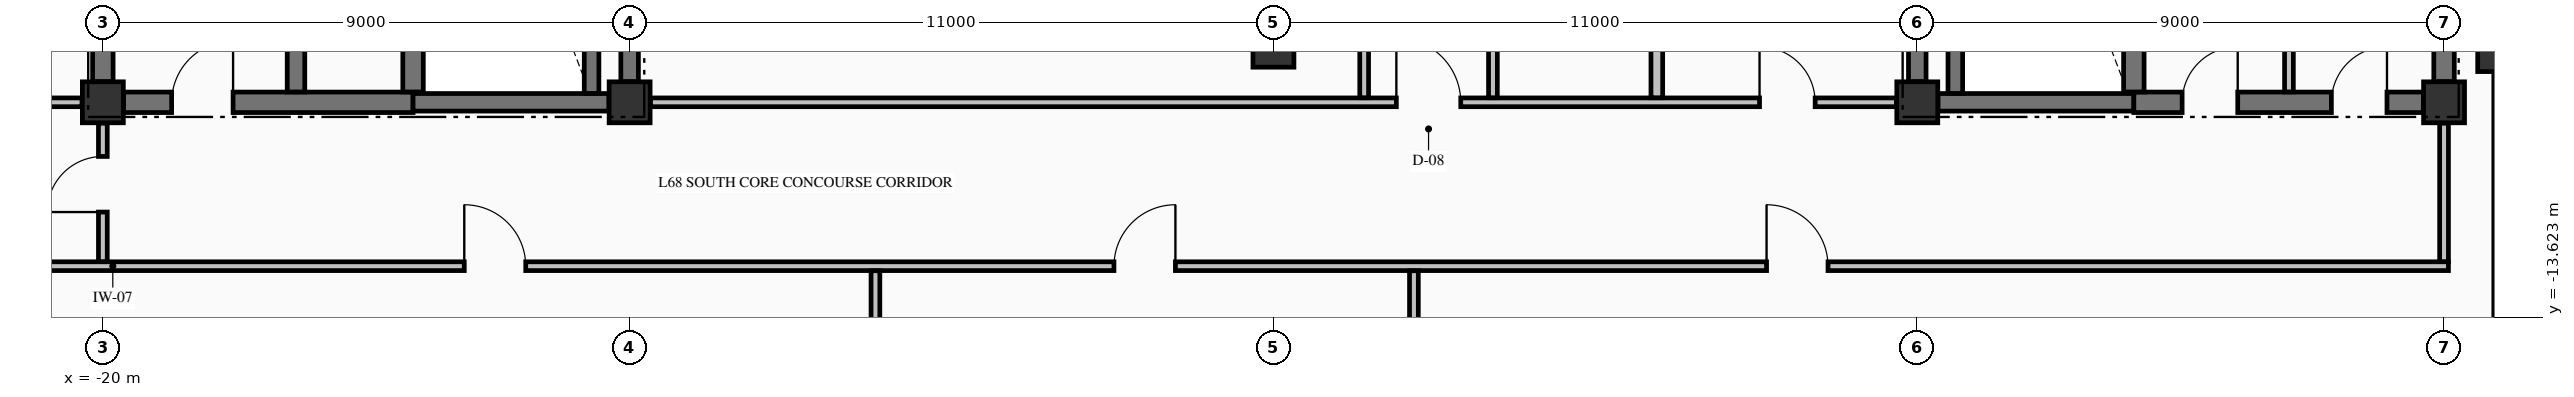
"""IFC4 building model, lengths in metres.
Left out: names, types, materials, properties, quantities, classifications, styles, units other than length and angle.
Written with IfcOpenShell. Run it as: python <this file> out.ifc"""

import sys

from ifc_helpers import new_model, si_unit, direction, frame, frame_2d, origin, origin_2d, place, context, subcontext, project, spatial, rectangle, extrude, element, fill, save


model = new_model("IFC4")
c1 = context("Model", 3, precision=1e-05, world=origin(), true_north=direction((0.0, 1.0)))
c2 = subcontext(c1, "Body", "Model", "MODEL_VIEW")
j1 = project(units=[si_unit("LENGTHUNIT", "METRE"), si_unit("PLANEANGLEUNIT", "RADIAN")], contexts=[c1])
p1 = place(None, origin())
s1 = spatial("IfcSite", under=j1, at=p1, CompositionType="ELEMENT")
p2 = place(p1, origin())
s2 = spatial("IfcBuilding", under=s1, at=p2, CompositionType="ELEMENT")
p3 = place(p2, frame((0.0, 0.0, 257.66)))
s3 = spatial("IfcBuildingStorey", under=s2, at=p3, CompositionType="ELEMENT", Elevation=257.66)
p4 = place(p3, frame((21.0, -9.0, -0.25), z_axis=(0.0, 0.0, 1.0), x_axis=(1.0, 0.0, 0.0)))
e1 = element("IfcColumn", 1, at=p4, inside=s3, PredefinedType="COLUMN", context=c2, shape_type="SweptSolid", body=[
    extrude(rectangle(XDim=0.85, YDim=0.85, at=origin_2d()), origin(), (0.0, 0.0, 1.0), 3.23),
])
for number, where, z_axis, x_axis in (
    (2, (-20.0, -9.95, -0.25), (0.0, 0.0, 1.0), (1.0, 0.0, 0.0)),
    (3, (-11.0, -9.95, -0.25), (0.0, 0.0, 1.0), (1.0, 0.0, 0.0)),
    (4, (11.0, -9.95, -0.25), (0.0, 0.0, 1.0), (1.0, 0.0, 0.0)),
    (5, (20.0, -9.95, -0.25), (0.0, 0.0, 1.0), (1.0, 0.0, 0.0)),
    (6, (0.0, -9.0, -0.25), (0.0, 0.0, 1.0), (1.0, 0.0, 0.0)),
):
    element("IfcColumn", number, at=place(p3, frame(where, z_axis=z_axis, x_axis=x_axis)), inside=s3, PredefinedType="COLUMN", context=c2, shape_type="SweptSolid", body=[
        extrude(rectangle(XDim=0.7, YDim=0.7, at=origin_2d()), origin(), (0.0, 0.0, 1.0), 3.23),
    ])
p5 = place(p3, frame((21.0, -17.545, 0.0), z_axis=(0.0, 0.0, 1.0), x_axis=(0.0, 1.0, 0.0)))
e7 = element("IfcWall", 7, at=p5, inside=s3, PredefinedType="STANDARD", context=c2, shape_type="SweptSolid", body=[
    extrude(rectangle(XDim=8.09, YDim=0.3, at=frame_2d((4.045, 0.0))), origin(), (0.0, 0.0, 1.0), 2.372),
])
p6 = place(p3, frame((-19.646, -9.95, 0.0), z_axis=(0.0, 0.0, 1.0), x_axis=(1.0, 0.0, 0.0)))
e8 = element("IfcWall", 8, at=p6, inside=s3, PredefinedType="SHEAR", context=c2, shape_type="SweptSolid", body=[
    extrude(rectangle(XDim=4.946, YDim=0.35, at=frame_2d((2.473, 0.0))), origin(), (0.0, 0.0, 1.0), 2.98),
])
p7 = place(p6, frame((0.821, 0.0, 0.0)))
e9 = element("IfcOpeningElement", 9, at=p7, cuts=e8, PredefinedType="OPENING", context=c2, shape_type="SweptSolid", body=[
    extrude(rectangle(XDim=1.05, YDim=2.15, at=frame_2d((0.525, 1.075))), frame((0.0, 0.185, 0.0), z_axis=(0.0, -1.0, 0.0), x_axis=(1.0, 0.0, 0.0)), (0.0, 0.0, 1.0), 0.37),
])
for number, where, z_axis, x_axis in (
    (10, (-14.7, -9.95, 0.0), (0.0, 0.0, 1.0), (1.0, 0.0, 0.0)),
    (11, (11.354, -9.95, 0.0), (0.0, 0.0, 1.0), (1.0, 0.0, 0.0)),
):
    element("IfcWall", number, at=place(p3, frame(where, z_axis=z_axis, x_axis=x_axis)), inside=s3, PredefinedType="SHEAR", context=c2, shape_type="SweptSolid", body=[
        extrude(rectangle(XDim=3.346, YDim=0.3, at=frame_2d((1.673, 0.0))), origin(), (0.0, 0.0, 1.0), 2.98),
    ])
p8 = place(p3, frame((14.7, -9.95, 0.0), z_axis=(0.0, 0.0, 1.0), x_axis=(1.0, 0.0, 0.0)))
e12 = element("IfcWall", 12, at=p8, inside=s3, PredefinedType="SHEAR", context=c2, shape_type="SweptSolid", body=[
    extrude(rectangle(XDim=4.946, YDim=0.35, at=frame_2d((2.473, 0.0))), origin(), (0.0, 0.0, 1.0), 2.98),
])
p9 = place(p8, frame((0.825, 0.0, 0.0)))
e13 = element("IfcOpeningElement", 13, at=p9, cuts=e12, PredefinedType="OPENING", context=c2, shape_type="SweptSolid", body=[
    extrude(rectangle(XDim=0.95, YDim=2.15, at=frame_2d((0.475, 1.075))), frame((0.0, 0.185, 0.0), z_axis=(0.0, -1.0, 0.0), x_axis=(1.0, 0.0, 0.0)), (0.0, 0.0, 1.0), 0.37),
])
p10 = place(p8, frame((3.375, 0.0, 0.0)))
e14 = element("IfcOpeningElement", 14, at=p10, cuts=e12, PredefinedType="OPENING", context=c2, shape_type="SweptSolid", body=[
    extrude(rectangle(XDim=0.95, YDim=2.15, at=frame_2d((0.475, 1.075))), frame((0.0, 0.185, 0.0), z_axis=(0.0, -1.0, 0.0), x_axis=(1.0, 0.0, 0.0)), (0.0, 0.0, 1.0), 0.37),
])
p11 = place(p3, frame((-25.835, -12.75, 0.0), z_axis=(0.0, 0.0, 1.0), x_axis=(1.0, 0.0, 0.0)))
e15 = element("IfcWall", 15, at=p11, inside=s3, PredefinedType="PARTITIONING", context=c2, shape_type="SweptSolid", body=[
    extrude(rectangle(XDim=45.91, YDim=0.15, at=frame_2d((22.955, 0.0))), origin(), (0.0, 0.0, 1.0), 2.98),
])
p12 = place(p11, frame((12.01, 0.0, 0.0)))
e16 = element("IfcOpeningElement", 16, at=p12, cuts=e15, PredefinedType="OPENING", context=c2, shape_type="SweptSolid", body=[
    extrude(rectangle(XDim=1.05, YDim=2.15, at=frame_2d((0.525, 1.075))), frame((0.0, 0.085, 0.0), z_axis=(0.0, -1.0, 0.0), x_axis=(1.0, 0.0, 0.0)), (0.0, 0.0, 1.0), 0.17),
])
p13 = place(p11, frame((23.11, 0.0, 0.0)))
e17 = element("IfcOpeningElement", 17, at=p13, cuts=e15, PredefinedType="OPENING", context=c2, shape_type="SweptSolid", body=[
    extrude(rectangle(XDim=1.05, YDim=2.15, at=frame_2d((0.525, 1.075))), frame((0.0, 0.085, 0.0), z_axis=(0.0, -1.0, 0.0), x_axis=(1.0, 0.0, 0.0)), (0.0, 0.0, 1.0), 0.17),
])
p14 = place(p11, frame((34.26, 0.0, 0.0)))
e18 = element("IfcOpeningElement", 18, at=p14, cuts=e15, PredefinedType="OPENING", context=c2, shape_type="SweptSolid", body=[
    extrude(rectangle(XDim=1.05, YDim=2.15, at=frame_2d((0.525, 1.075))), frame((0.0, 0.085, 0.0), z_axis=(0.0, -1.0, 0.0), x_axis=(1.0, 0.0, 0.0)), (0.0, 0.0, 1.0), 0.17),
])
p15 = place(p3, frame((-25.835, -9.95, 0.0), z_axis=(0.0, 0.0, 1.0), x_axis=(1.0, 0.0, 0.0)))
e19 = element("IfcWall", 19, at=p15, inside=s3, PredefinedType="PARTITIONING", context=c2, shape_type="SweptSolid", body=[
    extrude(rectangle(XDim=5.479, YDim=0.15, at=frame_2d((2.74, 0.0))), origin(), (0.0, 0.0, 1.0), 2.98),
])
p16 = place(p15, frame((2.36, 0.0, 0.0)))
e20 = element("IfcOpeningElement", 20, at=p16, cuts=e19, PredefinedType="OPENING", context=c2, shape_type="SweptSolid", body=[
    extrude(rectangle(XDim=0.95, YDim=2.15, at=frame_2d((0.475, 1.075))), frame((0.0, 0.085, 0.0), z_axis=(0.0, -1.0, 0.0), x_axis=(1.0, 0.0, 0.0)), (0.0, 0.0, 1.0), 0.17),
])
p17 = place(p3, frame((-10.644, -9.95, 0.0), z_axis=(0.0, 0.0, 1.0), x_axis=(1.0, 0.0, 0.0)))
e21 = element("IfcWall", 21, at=p17, inside=s3, PredefinedType="PARTITIONING", context=c2, shape_type="SweptSolid", body=[
    extrude(rectangle(XDim=21.288, YDim=0.15, at=frame_2d((10.644, 0.0))), origin(), (0.0, 0.0, 1.0), 2.98),
])
p18 = place(p17, frame((12.744, 0.0, 0.0)))
e22 = element("IfcOpeningElement", 22, at=p18, cuts=e21, PredefinedType="OPENING", context=c2, shape_type="SweptSolid", body=[
    extrude(rectangle(XDim=1.1, YDim=2.15, at=frame_2d((0.55, 1.075))), frame((0.0, 0.085, 0.0), z_axis=(0.0, -1.0, 0.0), x_axis=(1.0, 0.0, 0.0)), (0.0, 0.0, 1.0), 0.17),
])
p19 = place(p17, frame((18.949, 0.0, 0.0)))
e23 = element("IfcOpeningElement", 23, at=p19, cuts=e21, PredefinedType="OPENING", context=c2, shape_type="SweptSolid", body=[
    extrude(rectangle(XDim=0.95, YDim=2.15, at=frame_2d((0.475, 1.075))), frame((0.0, 0.085, 0.0), z_axis=(0.0, -1.0, 0.0), x_axis=(1.0, 0.0, 0.0)), (0.0, 0.0, 1.0), 0.17),
])
p20 = place(p3, frame((-20.0, -9.596, 0.0), z_axis=(0.0, 0.0, 1.0), x_axis=(0.0, 1.0, 0.0)))
e24 = element("IfcWall", 24, at=p20, inside=s3, PredefinedType="SHEAR", context=c2, shape_type="SweptSolid", body=[
    extrude(rectangle(XDim=9.242, YDim=0.35, at=frame_2d((4.621, 0.0))), origin(), (0.0, 0.0, 1.0), 2.98),
])
p21 = place(p3, frame((-16.7, -9.773, 0.0), z_axis=(0.0, 0.0, 1.0), x_axis=(0.0, 1.0, 0.0)))
e25 = element("IfcWall", 25, at=p21, inside=s3, PredefinedType="SHEAR", context=c2, shape_type="SweptSolid", body=[
    extrude(rectangle(XDim=9.371, YDim=0.3, at=frame_2d((4.686, 0.0))), origin(), (0.0, 0.0, 1.0), 2.98),
])
p22 = place(p3, frame((-14.7, -9.773, 0.0), z_axis=(0.0, 0.0, 1.0), x_axis=(0.0, 1.0, 0.0)))
e26 = element("IfcWall", 26, at=p22, inside=s3, PredefinedType="SHEAR", context=c2, shape_type="SweptSolid", body=[
    extrude(rectangle(XDim=9.371, YDim=0.35, at=frame_2d((4.686, 0.0))), origin(), (0.0, 0.0, 1.0), 2.98),
])
p23 = place(p3, frame((-11.65, -9.798, 0.0), z_axis=(0.0, 0.0, 1.0), x_axis=(0.0, 1.0, 0.0)))
e27 = element("IfcWall", 27, at=p23, inside=s3, PredefinedType="SOLIDWALL", context=c2, shape_type="SweptSolid", body=[
    extrude(rectangle(XDim=9.396, YDim=0.25, at=frame_2d((4.698, 0.0))), origin(), (0.0, 0.0, 1.0), 2.98),
])
for number, where, z_axis, x_axis in (
    (28, (-11.0, -9.596, 0.0), (0.0, 0.0, 1.0), (0.0, 1.0, 0.0)),
    (29, (11.0, -9.596, 0.0), (0.0, 0.0, 1.0), (0.0, 1.0, 0.0)),
):
    element("IfcWall", number, at=place(p3, frame(where, z_axis=z_axis, x_axis=x_axis)), inside=s3, PredefinedType="SHEAR", context=c2, shape_type="SweptSolid", body=[
        extrude(rectangle(XDim=9.242, YDim=0.3, at=frame_2d((4.621, 0.0))), origin(), (0.0, 0.0, 1.0), 2.98),
    ])
p24 = place(p3, frame((11.65, -9.798, 0.0), z_axis=(0.0, 0.0, 1.0), x_axis=(0.0, 1.0, 0.0)))
e30 = element("IfcWall", 30, at=p24, inside=s3, PredefinedType="SOLIDWALL", context=c2, shape_type="SweptSolid", body=[
    extrude(rectangle(XDim=9.396, YDim=0.25, at=frame_2d((4.698, 0.0))), origin(), (0.0, 0.0, 1.0), 2.98),
])
p25 = place(p3, frame((14.7, -9.773, 0.0), z_axis=(0.0, 0.0, 1.0), x_axis=(0.0, 1.0, 0.0)))
e31 = element("IfcWall", 31, at=p25, inside=s3, PredefinedType="SHEAR", context=c2, shape_type="SweptSolid", body=[
    extrude(rectangle(XDim=9.371, YDim=0.35, at=frame_2d((4.686, 0.0))), origin(), (0.0, 0.0, 1.0), 2.98),
])
p26 = place(p3, frame((20.0, -9.596, 0.0), z_axis=(0.0, 0.0, 1.0), x_axis=(0.0, 1.0, 0.0)))
e32 = element("IfcWall", 32, at=p26, inside=s3, PredefinedType="SHEAR", context=c2, shape_type="SweptSolid", body=[
    extrude(rectangle(XDim=14.769, YDim=0.35, at=frame_2d((7.385, 0.0))), origin(), (0.0, 0.0, 1.0), 2.98),
])
p27 = place(p3, frame((-20.0, -12.672, 0.0), z_axis=(0.0, 0.0, 1.0), x_axis=(0.0, 1.0, 0.0)))
e33 = element("IfcWall", 33, at=p27, inside=s3, PredefinedType="PARTITIONING", context=c2, shape_type="SweptSolid", body=[
    extrude(rectangle(XDim=2.366, YDim=0.15, at=frame_2d((1.183, 0.0))), origin(), (0.0, 0.0, 1.0), 2.98),
])
p28 = place(p27, frame((0.847, 0.0, 0.0)))
e34 = element("IfcOpeningElement", 34, at=p28, cuts=e33, PredefinedType="OPENING", context=c2, shape_type="SweptSolid", body=[
    extrude(rectangle(XDim=0.95, YDim=2.15, at=frame_2d((0.475, 1.075))), frame((0.0, 0.085, 0.0), z_axis=(0.0, -1.0, 0.0), x_axis=(1.0, 0.0, 0.0)), (0.0, 0.0, 1.0), 0.17),
])
p29 = place(p3, frame((-6.8, -23.335, 0.0), z_axis=(0.0, 0.0, 1.0), x_axis=(0.0, 1.0, 0.0)))
e35 = element("IfcWall", 35, at=p29, inside=s3, PredefinedType="PARTITIONING", context=c2, shape_type="SweptSolid", body=[
    extrude(rectangle(XDim=10.507, YDim=0.15, at=frame_2d((5.253, 0.0))), origin(), (0.0, 0.0, 1.0), 2.98),
])
p30 = place(p3, frame((1.55, -9.872, 0.0), z_axis=(0.0, 0.0, 1.0), x_axis=(0.0, 1.0, 0.0)))
e36 = element("IfcWall", 36, at=p30, inside=s3, PredefinedType="PARTITIONING", context=c2, shape_type="SweptSolid", body=[
    extrude(rectangle(XDim=9.544, YDim=0.15, at=frame_2d((4.772, 0.0))), origin(), (0.0, 0.0, 1.0), 2.98),
])
p31 = place(p3, frame((2.4, -23.335, 0.0), z_axis=(0.0, 0.0, 1.0), x_axis=(0.0, 1.0, 0.0)))
e37 = element("IfcWall", 37, at=p31, inside=s3, PredefinedType="PARTITIONING", context=c2, shape_type="SweptSolid", body=[
    extrude(rectangle(XDim=10.507, YDim=0.15, at=frame_2d((5.253, 0.0))), origin(), (0.0, 0.0, 1.0), 2.98),
])
p32 = place(p3, frame((3.75, -9.872, 0.0), z_axis=(0.0, 0.0, 1.0), x_axis=(0.0, 1.0, 0.0)))
e38 = element("IfcWall", 38, at=p32, inside=s3, PredefinedType="PARTITIONING", context=c2, shape_type="SweptSolid", body=[
    extrude(rectangle(XDim=5.519, YDim=0.15, at=frame_2d((2.76, 0.0))), origin(), (0.0, 0.0, 1.0), 2.98),
])
p33 = place(p32, frame((1.997, 0.0, 0.0)))
e39 = element("IfcOpeningElement", 39, at=p33, cuts=e38, PredefinedType="OPENING", context=c2, shape_type="SweptSolid", body=[
    extrude(rectangle(XDim=0.95, YDim=2.15, at=frame_2d((0.475, 1.075))), frame((0.0, 0.085, 0.0), z_axis=(0.0, -1.0, 0.0), x_axis=(1.0, 0.0, 0.0)), (0.0, 0.0, 1.0), 0.17),
])
p34 = place(p3, frame((6.55, -9.872, 0.0), z_axis=(0.0, 0.0, 1.0), x_axis=(0.0, 1.0, 0.0)))
e40 = element("IfcWall", 40, at=p34, inside=s3, PredefinedType="PARTITIONING", context=c2, shape_type="SweptSolid", body=[
    extrude(rectangle(XDim=5.519, YDim=0.2, at=frame_2d((2.76, 0.0))), origin(), (0.0, 0.0, 1.0), 2.98),
])
p35 = place(p3, frame((17.35, -9.772, 0.0), z_axis=(0.0, 0.0, 1.0), x_axis=(0.0, 1.0, 0.0)))
e41 = element("IfcWall", 41, at=p35, inside=s3, PredefinedType="PARTITIONING", context=c2, shape_type="SweptSolid", body=[
    extrude(rectangle(XDim=7.194, YDim=0.15, at=frame_2d((3.597, 0.0))), origin(), (0.0, 0.0, 1.0), 2.98),
])
p36 = place(p3, frame((20.0, -12.672, 0.0), z_axis=(0.0, 0.0, 1.0), x_axis=(0.0, 1.0, 0.0)))
e42 = element("IfcWall", 42, at=p36, inside=s3, PredefinedType="PARTITIONING", context=c2, shape_type="SweptSolid", body=[
    extrude(rectangle(XDim=2.366, YDim=0.15, at=frame_2d((1.183, 0.0))), origin(), (0.0, 0.0, 1.0), 2.57),
])
p37 = place(p7, origin())
e43 = element("IfcDoor", 43, at=p37, inside=s3, OperationType="SINGLE_SWING_RIGHT", PredefinedType="DOOR", context=c2, shape_type="SweptSolid", body=[
    extrude(rectangle(XDim=1.05, YDim=2.15, at=frame_2d((0.525, 1.075))), frame((0.0, 0.025, 0.0), z_axis=(0.0, -1.0, 0.0), x_axis=(1.0, 0.0, 0.0)), (0.0, 0.0, 1.0), 0.05),
])
fill(e9, e43)
p38 = place(p9, origin())
e44 = element("IfcDoor", 44, at=p38, inside=s3, OperationType="SINGLE_SWING_RIGHT", PredefinedType="DOOR", context=c2, shape_type="SweptSolid", body=[
    extrude(rectangle(XDim=0.95, YDim=2.15, at=frame_2d((0.475, 1.075))), frame((0.0, 0.025, 0.0), z_axis=(0.0, -1.0, 0.0), x_axis=(1.0, 0.0, 0.0)), (0.0, 0.0, 1.0), 0.05),
])
fill(e13, e44)
p39 = place(p10, origin())
e45 = element("IfcDoor", 45, at=p39, inside=s3, OperationType="SINGLE_SWING_RIGHT", PredefinedType="DOOR", context=c2, shape_type="SweptSolid", body=[
    extrude(rectangle(XDim=0.95, YDim=2.15, at=frame_2d((0.475, 1.075))), frame((0.0, 0.025, 0.0), z_axis=(0.0, -1.0, 0.0), x_axis=(1.0, 0.0, 0.0)), (0.0, 0.0, 1.0), 0.05),
])
fill(e14, e45)
p40 = place(p18, origin())
e46 = element("IfcDoor", 46, at=p40, inside=s3, OperationType="SINGLE_SWING_LEFT", PredefinedType="DOOR", context=c2, shape_type="SweptSolid", body=[
    extrude(rectangle(XDim=1.1, YDim=2.15, at=frame_2d((0.55, 1.075))), frame((0.0, 0.025, 0.0), z_axis=(0.0, -1.0, 0.0), x_axis=(1.0, 0.0, 0.0)), (0.0, 0.0, 1.0), 0.05),
])
fill(e22, e46)
p41 = place(p12, origin())
e47 = element("IfcDoor", 47, at=p41, inside=s3, OperationType="SINGLE_SWING_LEFT", PredefinedType="DOOR", context=c2, shape_type="SweptSolid", body=[
    extrude(rectangle(XDim=1.05, YDim=2.15, at=frame_2d((0.525, 1.075))), frame((0.0, 0.025, 0.0), z_axis=(0.0, -1.0, 0.0), x_axis=(1.0, 0.0, 0.0)), (0.0, 0.0, 1.0), 0.05),
])
fill(e16, e47)
p42 = place(p13, origin())
e48 = element("IfcDoor", 48, at=p42, inside=s3, OperationType="SINGLE_SWING_RIGHT", PredefinedType="DOOR", context=c2, shape_type="SweptSolid", body=[
    extrude(rectangle(XDim=1.05, YDim=2.15, at=frame_2d((0.525, 1.075))), frame((0.0, 0.025, 0.0), z_axis=(0.0, -1.0, 0.0), x_axis=(1.0, 0.0, 0.0)), (0.0, 0.0, 1.0), 0.05),
])
fill(e17, e48)
p43 = place(p14, origin())
e49 = element("IfcDoor", 49, at=p43, inside=s3, OperationType="SINGLE_SWING_LEFT", PredefinedType="DOOR", context=c2, shape_type="SweptSolid", body=[
    extrude(rectangle(XDim=1.05, YDim=2.15, at=frame_2d((0.525, 1.075))), frame((0.0, 0.025, 0.0), z_axis=(0.0, -1.0, 0.0), x_axis=(1.0, 0.0, 0.0)), (0.0, 0.0, 1.0), 0.05),
])
fill(e18, e49)
p44 = place(p19, origin())
e50 = element("IfcDoor", 50, at=p44, inside=s3, OperationType="SINGLE_SWING_LEFT", PredefinedType="DOOR", context=c2, shape_type="SweptSolid", body=[
    extrude(rectangle(XDim=0.95, YDim=2.15, at=frame_2d((0.475, 1.075))), frame((0.0, 0.025, 0.0), z_axis=(0.0, -1.0, 0.0), x_axis=(1.0, 0.0, 0.0)), (0.0, 0.0, 1.0), 0.05),
])
fill(e23, e50)
p45 = place(p28, origin())
e51 = element("IfcDoor", 51, at=p45, inside=s3, OperationType="SINGLE_SWING_LEFT", PredefinedType="DOOR", context=c2, shape_type="SweptSolid", body=[
    extrude(rectangle(XDim=0.95, YDim=2.15, at=frame_2d((0.475, 1.075))), frame((0.0, 0.025, 0.0), z_axis=(0.0, -1.0, 0.0), x_axis=(1.0, 0.0, 0.0)), (0.0, 0.0, 1.0), 0.05),
])
fill(e34, e51)
save(model, sys.argv[1])
